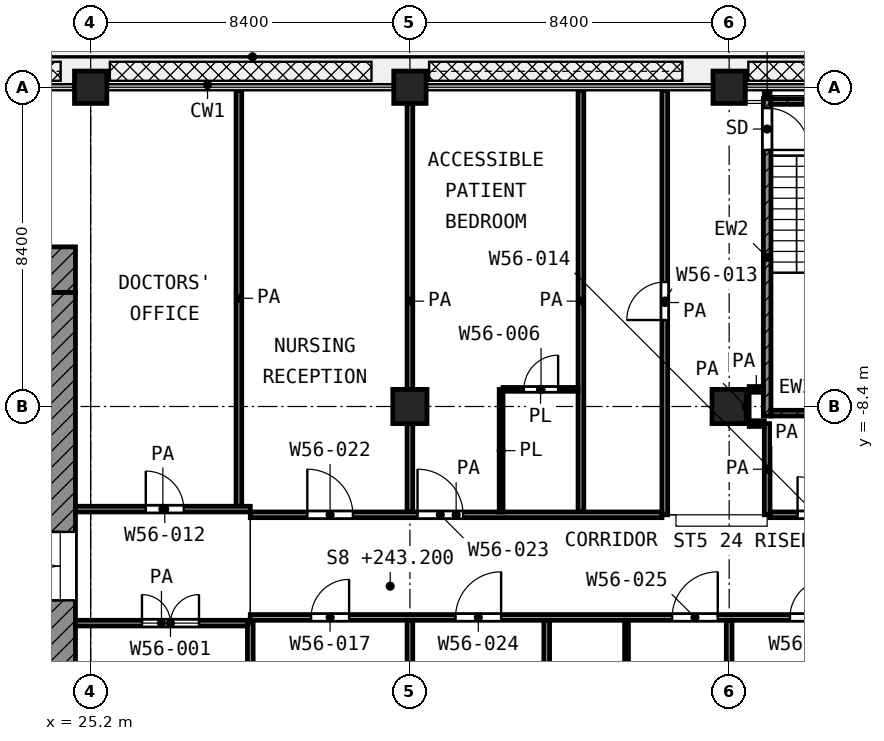
"""IFC4 building model, lengths in metres.
Left out: names, types, materials, properties, quantities, classifications, styles, units other than length and angle.
Written with IfcOpenShell. Run it as: python <this file> out.ifc"""

import sys

from ifc_helpers import new_model, si_unit, direction, frame, frame_2d, origin, origin_2d, place, context, subcontext, project, spatial, rectangle, extrude, element, fill, save


model = new_model("IFC4")
c1 = context("Model", 3, precision=1e-05, world=origin(), true_north=direction((0.0, 1.0)))
c2 = subcontext(c1, "Body", "Model", "MODEL_VIEW")
j1 = project(units=[si_unit("LENGTHUNIT", "METRE"), si_unit("PLANEANGLEUNIT", "RADIAN")], contexts=[c1])
p1 = place(None, origin())
s1 = spatial("IfcSite", under=j1, at=p1, CompositionType="ELEMENT")
p2 = place(p1, origin())
s2 = spatial("IfcBuilding", under=s1, at=p2, CompositionType="ELEMENT")
p3 = place(p2, frame((0.0, 0.0, 243.2)))
s3 = spatial("IfcBuildingStorey", under=s2, at=p3, CompositionType="ELEMENT", Elevation=243.2)
for number, where, z_axis, x_axis in (
    (1, (25.2, 0.0, 0.0), (0.0, 0.0, 1.0), (1.0, 0.0, 0.0)),
    (2, (33.6, 0.0, 0.0), (0.0, 0.0, 1.0), (1.0, 0.0, 0.0)),
    (3, (42.0, 0.0, 0.0), (0.0, 0.0, 1.0), (1.0, 0.0, 0.0)),
):
    element("IfcColumn", number, at=place(p3, frame(where, z_axis=z_axis, x_axis=x_axis)), inside=s3, PredefinedType="COLUMN", context=c2, shape_type="SweptSolid", body=[
        extrude(rectangle(XDim=0.85, YDim=0.85, at=origin_2d()), origin(), (0.0, 0.0, 1.0), 4.2),
    ])
for number, where, z_axis, x_axis in (
    (4, (33.6, -8.4, 0.0), (0.0, 0.0, 1.0), (1.0, 0.0, 0.0)),
    (5, (42.0, -8.4, 0.0), (0.0, 0.0, 1.0), (1.0, 0.0, 0.0)),
):
    element("IfcColumn", number, at=place(p3, frame(where, z_axis=z_axis, x_axis=x_axis)), inside=s3, PredefinedType="COLUMN", context=c2, shape_type="SweptSolid", body=[
        extrude(rectangle(XDim=0.9, YDim=0.9, at=origin_2d()), origin(), (0.0, 0.0, 1.0), 4.2),
    ])
p4 = place(p3, frame((4.2, -4.8, 0.0), z_axis=(0.0, 0.0, 1.0), x_axis=(1.0, 0.0, 0.0)))
e6 = element("IfcWall", 6, at=p4, inside=s3, PredefinedType="SHEAR", context=c2, shape_type="SweptSolid", body=[
    extrude(rectangle(XDim=20.6, YDim=1.2, at=frame_2d((10.3, 0.0))), origin(), (0.0, 0.0, 1.0), 3.6),
])
p5 = place(p4, frame((1.95, 0.0, 0.0)))
e7 = element("IfcOpeningElement", 7, at=p5, cuts=e6, PredefinedType="OPENING", context=c2, shape_type="SweptSolid", body=[
    extrude(rectangle(XDim=1.1, YDim=2.1, at=frame_2d((0.55, 1.05))), frame((0.0, 0.61, 0.0), z_axis=(0.0, -1.0, 0.0), x_axis=(1.0, 0.0, 0.0)), (0.0, 0.0, 1.0), 1.22),
])
p6 = place(p4, frame((17.95, 0.0, 0.0)))
e8 = element("IfcOpeningElement", 8, at=p6, cuts=e6, PredefinedType="OPENING", context=c2, shape_type="SweptSolid", body=[
    extrude(rectangle(XDim=1.1, YDim=2.1, at=frame_2d((0.55, 1.05))), frame((0.0, 0.61, 0.0), z_axis=(0.0, -1.0, 0.0), x_axis=(1.0, 0.0, 0.0)), (0.0, 0.0, 1.0), 1.22),
])
p7 = place(p3, frame((24.4, -24.0, 0.0), z_axis=(0.0, 0.0, 1.0), x_axis=(0.0, 1.0, 0.0)))
e9 = element("IfcWall", 9, at=p7, inside=s3, PredefinedType="SHEAR", context=c2, shape_type="SweptSolid", body=[
    extrude(rectangle(XDim=18.6, YDim=0.8, at=frame_2d((9.3, 0.0))), origin(), (0.0, 0.0, 1.0), 3.6),
])
p8 = place(p7, frame((10.5, 0.0, 0.0)))
e10 = element("IfcOpeningElement", 10, at=p8, cuts=e9, PredefinedType="OPENING", context=c2, shape_type="SweptSolid", body=[
    extrude(rectangle(XDim=1.8, YDim=2.1, at=frame_2d((0.9, 1.05))), frame((0.0, 0.41, 0.0), z_axis=(0.0, -1.0, 0.0), x_axis=(1.0, 0.0, 0.0)), (0.0, 0.0, 1.0), 0.82),
])
p9 = place(p3, frame((43.0, -8.65, 0.0), z_axis=(0.0, 0.0, 1.0), x_axis=(0.0, 1.0, 0.0)))
e11 = element("IfcWall", 11, at=p9, inside=s3, PredefinedType="SHEAR", context=c2, shape_type="SweptSolid", body=[
    extrude(rectangle(XDim=8.35, YDim=0.2, at=frame_2d((4.175, 0.0))), origin(), (0.0, 0.0, 1.0), 3.6),
])
p10 = place(p9, frame((7.0, 0.0, 0.0)))
e12 = element("IfcOpeningElement", 12, at=p10, cuts=e11, PredefinedType="OPENING", context=c2, shape_type="SweptSolid", body=[
    extrude(rectangle(XDim=1.1, YDim=2.1, at=frame_2d((0.55, 1.05))), frame((0.0, 0.11, 0.0), z_axis=(0.0, -1.0, 0.0), x_axis=(1.0, 0.0, 0.0)), (0.0, 0.0, 1.0), 0.22),
])
for number, where, z_axis, x_axis in (
    (13, (43.1, -0.375, 0.0), (0.0, 0.0, 1.0), (1.0, 0.0, 0.0)),
    (14, (43.1, -8.575, 0.0), (0.0, 0.0, 1.0), (1.0, 0.0, 0.0)),
):
    element("IfcWall", number, at=place(p3, frame(where, z_axis=z_axis, x_axis=x_axis)), inside=s3, PredefinedType="SHEAR", context=c2, shape_type="SweptSolid", body=[
        extrude(rectangle(XDim=2.85, YDim=0.15, at=frame_2d((1.425, 0.0))), origin(), (0.0, 0.0, 1.0), 3.6),
    ])
p11 = place(p3, frame((36.05, -7.95, 0.0), z_axis=(0.0, 0.0, 1.0), x_axis=(1.0, 0.0, 0.0)))
e15 = element("IfcWall", 15, at=p11, inside=s3, PredefinedType="PARTITIONING", context=c2, shape_type="SweptSolid", body=[
    extrude(rectangle(XDim=1.975, YDim=0.1, at=frame_2d((0.987, 0.0))), origin(), (0.0, 0.0, 1.0), 3.6),
])
p12 = place(p11, frame((0.55, 0.0, 0.0)))
e16 = element("IfcOpeningElement", 16, at=p12, cuts=e15, PredefinedType="OPENING", context=c2, shape_type="SweptSolid", body=[
    extrude(rectangle(XDim=0.9, YDim=2.1, at=frame_2d((0.45, 1.05))), frame((0.0, 0.06, 0.0), z_axis=(0.0, -1.0, 0.0), x_axis=(1.0, 0.0, 0.0)), (0.0, 0.0, 1.0), 0.12),
])
for number, where, z_axis, x_axis in (
    (17, (36.0, -11.175, 0.0), (0.0, 0.0, 1.0), (0.0, 1.0, 0.0)),
    (18, (39.3, -17.25, 0.0), (0.0, 0.0, 1.0), (0.0, 1.0, 0.0)),
):
    element("IfcWall", number, at=place(p3, frame(where, z_axis=z_axis, x_axis=x_axis)), inside=s3, PredefinedType="PARTITIONING", context=c2, shape_type="SweptSolid", body=[
        extrude(rectangle(XDim=3.225, YDim=0.1, at=frame_2d((1.613, 0.0))), origin(), (0.0, 0.0, 1.0), 3.6),
    ])
p13 = place(p3, frame((24.8, -14.1, 0.0), z_axis=(0.0, 0.0, 1.0), x_axis=(1.0, 0.0, 0.0)))
e19 = element("IfcWall", 19, at=p13, inside=s3, PredefinedType="PARTITIONING", context=c2, shape_type="SweptSolid", body=[
    extrude(rectangle(XDim=4.525, YDim=0.15, at=frame_2d((2.262, 0.0))), origin(), (0.0, 0.0, 1.0), 3.6),
])
p14 = place(p13, frame((1.75, 0.0, 0.0)))
e20 = element("IfcOpeningElement", 20, at=p14, cuts=e19, PredefinedType="OPENING", context=c2, shape_type="SweptSolid", body=[
    extrude(rectangle(XDim=1.5, YDim=2.1, at=frame_2d((0.75, 1.05))), frame((0.0, 0.085, 0.0), z_axis=(0.0, -1.0, 0.0), x_axis=(1.0, 0.0, 0.0)), (0.0, 0.0, 1.0), 0.17),
])
p15 = place(p3, frame((29.4, -13.95, 0.0), z_axis=(0.0, 0.0, 1.0), x_axis=(1.0, 0.0, 0.0)))
e21 = element("IfcWall", 21, at=p15, inside=s3, PredefinedType="PARTITIONING", context=c2, shape_type="SweptSolid", body=[
    extrude(rectangle(XDim=33.52, YDim=0.15, at=frame_2d((16.76, 0.0))), origin(), (0.0, 0.0, 1.0), 2.7),
])
p16 = place(p15, frame((1.6, 0.0, 0.0)))
e22 = element("IfcOpeningElement", 22, at=p16, cuts=e21, PredefinedType="OPENING", context=c2, shape_type="SweptSolid", body=[
    extrude(rectangle(XDim=1.0, YDim=2.1, at=frame_2d((0.5, 1.05))), frame((0.0, 0.085, 0.0), z_axis=(0.0, -1.0, 0.0), x_axis=(1.0, 0.0, 0.0)), (0.0, 0.0, 1.0), 0.17),
])
p17 = place(p15, frame((5.4, 0.0, 0.0)))
e23 = element("IfcOpeningElement", 23, at=p17, cuts=e21, PredefinedType="OPENING", context=c2, shape_type="SweptSolid", body=[
    extrude(rectangle(XDim=1.2, YDim=2.1, at=frame_2d((0.6, 1.05))), frame((0.0, 0.085, 0.0), z_axis=(0.0, -1.0, 0.0), x_axis=(1.0, 0.0, 0.0)), (0.0, 0.0, 1.0), 0.17),
])
p18 = place(p15, frame((11.1, 0.0, 0.0)))
e24 = element("IfcOpeningElement", 24, at=p18, cuts=e21, PredefinedType="OPENING", context=c2, shape_type="SweptSolid", body=[
    extrude(rectangle(XDim=1.2, YDim=2.1, at=frame_2d((0.6, 1.05))), frame((0.0, 0.085, 0.0), z_axis=(0.0, -1.0, 0.0), x_axis=(1.0, 0.0, 0.0)), (0.0, 0.0, 1.0), 0.17),
])
p19 = place(p15, frame((14.2, 0.0, 0.0)))
e25 = element("IfcOpeningElement", 25, at=p19, cuts=e21, PredefinedType="OPENING", context=c2, shape_type="SweptSolid", body=[
    extrude(rectangle(XDim=1.0, YDim=2.1, at=frame_2d((0.5, 1.05))), frame((0.0, 0.085, 0.0), z_axis=(0.0, -1.0, 0.0), x_axis=(1.0, 0.0, 0.0)), (0.0, 0.0, 1.0), 0.17),
])
p20 = place(p15, frame((19.6, 0.0, 0.0)))
e26 = element("IfcOpeningElement", 26, at=p20, cuts=e21, PredefinedType="OPENING", context=c2, shape_type="SweptSolid", body=[
    extrude(rectangle(XDim=1.2, YDim=2.1, at=frame_2d((0.6, 1.05))), frame((0.0, 0.085, 0.0), z_axis=(0.0, -1.0, 0.0), x_axis=(1.0, 0.0, 0.0)), (0.0, 0.0, 1.0), 0.17),
])
p21 = place(p15, frame((22.2, 0.0, 0.0)))
e27 = element("IfcOpeningElement", 27, at=p21, cuts=e21, PredefinedType="OPENING", context=c2, shape_type="SweptSolid", body=[
    extrude(rectangle(XDim=1.2, YDim=2.1, at=frame_2d((0.6, 1.05))), frame((0.0, 0.085, 0.0), z_axis=(0.0, -1.0, 0.0), x_axis=(1.0, 0.0, 0.0)), (0.0, 0.0, 1.0), 0.17),
])
p22 = place(p15, frame((28.95, 0.0, 0.0)))
e28 = element("IfcOpeningElement", 28, at=p22, cuts=e21, PredefinedType="OPENING", context=c2, shape_type="SweptSolid", body=[
    extrude(rectangle(XDim=1.5, YDim=2.1, at=frame_2d((0.75, 1.05))), frame((0.0, 0.085, 0.0), z_axis=(0.0, -1.0, 0.0), x_axis=(1.0, 0.0, 0.0)), (0.0, 0.0, 1.0), 0.17),
])
p23 = place(p3, frame((29.4, -11.25, 0.0), z_axis=(0.0, 0.0, 1.0), x_axis=(1.0, 0.0, 0.0)))
e29 = element("IfcWall", 29, at=p23, inside=s3, PredefinedType="PARTITIONING", context=c2, shape_type="SweptSolid", body=[
    extrude(rectangle(XDim=10.832, YDim=0.15, at=frame_2d((5.416, 0.0))), origin(), (0.0, 0.0, 1.0), 3.6),
])
p24 = place(p23, frame((1.5, 0.0, 0.0)))
e30 = element("IfcOpeningElement", 30, at=p24, cuts=e29, PredefinedType="OPENING", context=c2, shape_type="SweptSolid", body=[
    extrude(rectangle(XDim=1.2, YDim=2.1, at=frame_2d((0.6, 1.05))), frame((0.0, 0.085, 0.0), z_axis=(0.0, -1.0, 0.0), x_axis=(1.0, 0.0, 0.0)), (0.0, 0.0, 1.0), 0.17),
])
p25 = place(p23, frame((4.4, 0.0, 0.0)))
e31 = element("IfcOpeningElement", 31, at=p25, cuts=e29, PredefinedType="OPENING", context=c2, shape_type="SweptSolid", body=[
    extrude(rectangle(XDim=1.2, YDim=2.1, at=frame_2d((0.6, 1.05))), frame((0.0, 0.085, 0.0), z_axis=(0.0, -1.0, 0.0), x_axis=(1.0, 0.0, 0.0)), (0.0, 0.0, 1.0), 0.17),
])
p26 = place(p3, frame((43.075, -11.25, 0.0), z_axis=(0.0, 0.0, 1.0), x_axis=(1.0, 0.0, 0.0)))
e32 = element("IfcWall", 32, at=p26, inside=s3, PredefinedType="PARTITIONING", context=c2, shape_type="SweptSolid", body=[
    extrude(rectangle(XDim=5.375, YDim=0.15, at=frame_2d((2.688, 0.0))), origin(), (0.0, 0.0, 1.0), 3.6),
])
p27 = place(p26, frame((0.725, 0.0, 0.0)))
e33 = element("IfcOpeningElement", 33, at=p27, cuts=e32, PredefinedType="OPENING", context=c2, shape_type="SweptSolid", body=[
    extrude(rectangle(XDim=1.0, YDim=2.1, at=frame_2d((0.5, 1.05))), frame((0.0, 0.085, 0.0), z_axis=(0.0, -1.0, 0.0), x_axis=(1.0, 0.0, 0.0)), (0.0, 0.0, 1.0), 0.17),
])
p28 = place(p26, frame((3.487, 0.0, 0.0)))
e34 = element("IfcOpeningElement", 34, at=p28, cuts=e32, PredefinedType="OPENING", context=c2, shape_type="SweptSolid", body=[
    extrude(rectangle(XDim=1.0, YDim=2.1, at=frame_2d((0.5, 1.05))), frame((0.0, 0.085, 0.0), z_axis=(0.0, -1.0, 0.0), x_axis=(1.0, 0.0, 0.0)), (0.0, 0.0, 1.0), 0.17),
])
p29 = place(p3, frame((24.8, -11.1, 0.0), z_axis=(0.0, 0.0, 1.0), x_axis=(1.0, 0.0, 0.0)))
e35 = element("IfcWall", 35, at=p29, inside=s3, PredefinedType="PARTITIONING", context=c2, shape_type="SweptSolid", body=[
    extrude(rectangle(XDim=4.6, YDim=0.15, at=frame_2d((2.3, 0.0))), origin(), (0.0, 0.0, 1.0), 3.6),
])
p30 = place(p29, frame((1.85, 0.0, 0.0)))
e36 = element("IfcOpeningElement", 36, at=p30, cuts=e35, PredefinedType="OPENING", context=c2, shape_type="SweptSolid", body=[
    extrude(rectangle(XDim=1.0, YDim=2.1, at=frame_2d((0.5, 1.05))), frame((0.0, 0.085, 0.0), z_axis=(0.0, -1.0, 0.0), x_axis=(1.0, 0.0, 0.0)), (0.0, 0.0, 1.0), 0.17),
])
p31 = place(p3, frame((42.527, -8.85, 0.0), z_axis=(0.0, 0.0, 1.0), x_axis=(1.0, 0.0, 0.0)))
e37 = element("IfcWall", 37, at=p31, inside=s3, PredefinedType="PARTITIONING", context=c2, shape_type="SweptSolid", body=[
    extrude(rectangle(XDim=0.398, YDim=0.15, at=frame_2d((0.199, 0.0))), origin(), (0.0, 0.0, 1.0), 3.6),
])
p32 = place(p3, frame((42.527, -7.95, 0.0), z_axis=(0.0, 0.0, 1.0), x_axis=(1.0, 0.0, 0.0)))
e38 = element("IfcWall", 38, at=p32, inside=s3, PredefinedType="PARTITIONING", context=c2, shape_type="SweptSolid", body=[
    extrude(rectangle(XDim=0.373, YDim=0.15, at=frame_2d((0.187, 0.0))), origin(), (0.0, 0.0, 1.0), 3.6),
])
p33 = place(p3, frame((29.1, -11.025, 0.0), z_axis=(0.0, 0.0, 1.0), x_axis=(0.0, 1.0, 0.0)))
e39 = element("IfcWall", 39, at=p33, inside=s3, PredefinedType="PARTITIONING", context=c2, shape_type="SweptSolid", body=[
    extrude(rectangle(XDim=10.945, YDim=0.15, at=frame_2d((5.472, 0.0))), origin(), (0.0, 0.0, 1.0), 3.6),
])
p34 = place(p3, frame((29.4, -25.2, 0.0), z_axis=(0.0, 0.0, 1.0), x_axis=(0.0, 1.0, 0.0)))
e40 = element("IfcWall", 40, at=p34, inside=s3, PredefinedType="PARTITIONING", context=c2, shape_type="SweptSolid", body=[
    extrude(rectangle(XDim=11.1, YDim=0.15, at=frame_2d((5.55, 0.0))), origin(), (0.0, 0.0, 1.0), 3.6),
])
p35 = place(p3, frame((33.6, -25.12, 0.0), z_axis=(0.0, 0.0, 1.0), x_axis=(0.0, 1.0, 0.0)))
e41 = element("IfcWall", 41, at=p35, inside=s3, PredefinedType="PARTITIONING", context=c2, shape_type="SweptSolid", body=[
    extrude(rectangle(XDim=11.095, YDim=0.15, at=frame_2d((5.548, 0.0))), origin(), (0.0, 0.0, 1.0), 3.6),
])
p36 = place(p3, frame((33.6, -11.175, 0.0), z_axis=(0.0, 0.0, 1.0), x_axis=(0.0, 1.0, 0.0)))
e42 = element("IfcWall", 42, at=p36, inside=s3, PredefinedType="PARTITIONING", context=c2, shape_type="SweptSolid", body=[
    extrude(rectangle(XDim=11.095, YDim=0.15, at=frame_2d((5.547, 0.0))), origin(), (0.0, 0.0, 1.0), 3.6),
])
p37 = place(p3, frame((37.2, -25.12, 0.0), z_axis=(0.0, 0.0, 1.0), x_axis=(0.0, 1.0, 0.0)))
e43 = element("IfcWall", 43, at=p37, inside=s3, PredefinedType="PARTITIONING", context=c2, shape_type="SweptSolid", body=[
    extrude(rectangle(XDim=11.095, YDim=0.15, at=frame_2d((5.548, 0.0))), origin(), (0.0, 0.0, 1.0), 3.6),
])
p38 = place(p3, frame((38.1, -11.175, 0.0), z_axis=(0.0, 0.0, 1.0), x_axis=(0.0, 1.0, 0.0)))
e44 = element("IfcWall", 44, at=p38, inside=s3, PredefinedType="PARTITIONING", context=c2, shape_type="SweptSolid", body=[
    extrude(rectangle(XDim=11.095, YDim=0.15, at=frame_2d((5.547, 0.0))), origin(), (0.0, 0.0, 1.0), 3.6),
])
p39 = place(p3, frame((40.307, -11.25, 0.0), z_axis=(0.0, 0.0, 1.0), x_axis=(0.0, 1.0, 0.0)))
e45 = element("IfcWall", 45, at=p39, inside=s3, PredefinedType="PARTITIONING", context=c2, shape_type="SweptSolid", body=[
    extrude(rectangle(XDim=11.17, YDim=0.15, at=frame_2d((5.585, 0.0))), origin(), (0.0, 0.0, 1.0), 3.6),
])
p40 = place(p39, frame((5.125, 0.0, 0.0)))
e46 = element("IfcOpeningElement", 46, at=p40, cuts=e45, PredefinedType="OPENING", context=c2, shape_type="SweptSolid", body=[
    extrude(rectangle(XDim=1.0, YDim=2.1, at=frame_2d((0.5, 1.05))), frame((0.0, 0.085, 0.0), z_axis=(0.0, -1.0, 0.0), x_axis=(1.0, 0.0, 0.0)), (0.0, 0.0, 1.0), 0.17),
])
p41 = place(p3, frame((42.0, -25.12, 0.0), z_axis=(0.0, 0.0, 1.0), x_axis=(0.0, 1.0, 0.0)))
e47 = element("IfcWall", 47, at=p41, inside=s3, PredefinedType="PARTITIONING", context=c2, shape_type="SweptSolid", body=[
    extrude(rectangle(XDim=11.095, YDim=0.15, at=frame_2d((5.548, 0.0))), origin(), (0.0, 0.0, 1.0), 3.6),
])
p42 = place(p3, frame((42.45, -8.849, 0.0), z_axis=(0.0, 0.0, 1.0), x_axis=(0.0, 1.0, 0.0)))
e48 = element("IfcWall", 48, at=p42, inside=s3, PredefinedType="PARTITIONING", context=c2, shape_type="SweptSolid", body=[
    extrude(rectangle(XDim=0.897, YDim=0.15, at=frame_2d((0.449, 0.0))), origin(), (0.0, 0.0, 1.0), 3.6),
])
p43 = place(p3, frame((43.0, -11.25, 0.0), z_axis=(0.0, 0.0, 1.0), x_axis=(0.0, 1.0, 0.0)))
e49 = element("IfcWall", 49, at=p43, inside=s3, PredefinedType="PARTITIONING", context=c2, shape_type="SweptSolid", body=[
    extrude(rectangle(XDim=2.4, YDim=0.15, at=frame_2d((1.2, 0.0))), origin(), (0.0, 0.0, 1.0), 3.6),
])
p44 = place(p3, frame((43.0, -0.27, 0.0), z_axis=(0.0, 0.0, 1.0), x_axis=(0.0, 1.0, 0.0)))
e50 = element("IfcWall", 50, at=p44, inside=s3, PredefinedType="PARTITIONING", context=c2, shape_type="SweptSolid", body=[
    extrude(rectangle(XDim=0.19, YDim=0.15, at=frame_2d((0.095, 0.0))), origin(), (0.0, 0.0, 1.0), 3.6),
])
p45 = place(p8, origin())
e51 = element("IfcDoor", 51, at=p45, inside=s3, OperationType="DOUBLE_DOOR_SINGLE_SWING", PredefinedType="DOOR", context=c2, shape_type="SweptSolid", body=[
    extrude(rectangle(XDim=1.8, YDim=2.1, at=frame_2d((0.9, 1.05))), frame((0.0, 0.025, 0.0), z_axis=(0.0, -1.0, 0.0), x_axis=(1.0, 0.0, 0.0)), (0.0, 0.0, 1.0), 0.05),
])
fill(e10, e51)
p46 = place(p10, frame((1.1, 0.0, 0.0), z_axis=(0.0, 0.0, 1.0), x_axis=(-1.0, 0.0, 0.0)))
e52 = element("IfcDoor", 52, at=p46, inside=s3, OperationType="SINGLE_SWING_LEFT", PredefinedType="DOOR", context=c2, shape_type="SweptSolid", body=[
    extrude(rectangle(XDim=1.1, YDim=2.1, at=frame_2d((0.55, 1.05))), frame((0.0, 0.025, 0.0), z_axis=(0.0, -1.0, 0.0), x_axis=(1.0, 0.0, 0.0)), (0.0, 0.0, 1.0), 0.05),
])
fill(e12, e52)
p47 = place(p14, origin())
e53 = element("IfcDoor", 53, at=p47, inside=s3, OperationType="DOUBLE_DOOR_SINGLE_SWING", PredefinedType="DOOR", context=c2, shape_type="SweptSolid", body=[
    extrude(rectangle(XDim=1.5, YDim=2.1, at=frame_2d((0.75, 1.05))), frame((0.0, 0.025, 0.0), z_axis=(0.0, -1.0, 0.0), x_axis=(1.0, 0.0, 0.0)), (0.0, 0.0, 1.0), 0.05),
])
fill(e20, e53)
p48 = place(p30, origin())
e54 = element("IfcDoor", 54, at=p48, inside=s3, OperationType="SINGLE_SWING_LEFT", PredefinedType="DOOR", context=c2, shape_type="SweptSolid", body=[
    extrude(rectangle(XDim=1.0, YDim=2.1, at=frame_2d((0.5, 1.05))), frame((0.0, 0.025, 0.0), z_axis=(0.0, -1.0, 0.0), x_axis=(1.0, 0.0, 0.0)), (0.0, 0.0, 1.0), 0.05),
])
fill(e36, e54)
p49 = place(p24, origin())
e55 = element("IfcDoor", 55, at=p49, inside=s3, OperationType="SINGLE_SWING_LEFT", PredefinedType="DOOR", context=c2, shape_type="SweptSolid", body=[
    extrude(rectangle(XDim=1.2, YDim=2.1, at=frame_2d((0.6, 1.05))), frame((0.0, 0.025, 0.0), z_axis=(0.0, -1.0, 0.0), x_axis=(1.0, 0.0, 0.0)), (0.0, 0.0, 1.0), 0.05),
])
fill(e30, e55)
p50 = place(p25, origin())
e56 = element("IfcDoor", 56, at=p50, inside=s3, OperationType="SINGLE_SWING_LEFT", PredefinedType="DOOR", context=c2, shape_type="SweptSolid", body=[
    extrude(rectangle(XDim=1.2, YDim=2.1, at=frame_2d((0.6, 1.05))), frame((0.0, 0.025, 0.0), z_axis=(0.0, -1.0, 0.0), x_axis=(1.0, 0.0, 0.0)), (0.0, 0.0, 1.0), 0.05),
])
fill(e31, e56)
p51 = place(p12, origin())
e57 = element("IfcDoor", 57, at=p51, inside=s3, OperationType="SINGLE_SWING_RIGHT", PredefinedType="DOOR", context=c2, shape_type="SweptSolid", body=[
    extrude(rectangle(XDim=0.9, YDim=2.1, at=frame_2d((0.45, 1.05))), frame((0.0, 0.025, 0.0), z_axis=(0.0, -1.0, 0.0), x_axis=(1.0, 0.0, 0.0)), (0.0, 0.0, 1.0), 0.05),
])
fill(e16, e57)
p52 = place(p40, origin())
e58 = element("IfcDoor", 58, at=p52, inside=s3, OperationType="SINGLE_SWING_LEFT", PredefinedType="DOOR", context=c2, shape_type="SweptSolid", body=[
    extrude(rectangle(XDim=1.0, YDim=2.1, at=frame_2d((0.5, 1.05))), frame((0.0, 0.025, 0.0), z_axis=(0.0, -1.0, 0.0), x_axis=(1.0, 0.0, 0.0)), (0.0, 0.0, 1.0), 0.05),
])
fill(e46, e58)
p53 = place(p27, origin())
e59 = element("IfcDoor", 59, at=p53, inside=s3, OperationType="SINGLE_SWING_LEFT", PredefinedType="DOOR", context=c2, shape_type="SweptSolid", body=[
    extrude(rectangle(XDim=1.0, YDim=2.1, at=frame_2d((0.5, 1.05))), frame((0.0, 0.025, 0.0), z_axis=(0.0, -1.0, 0.0), x_axis=(1.0, 0.0, 0.0)), (0.0, 0.0, 1.0), 0.05),
])
fill(e33, e59)
p54 = place(p16, origin())
e60 = element("IfcDoor", 60, at=p54, inside=s3, OperationType="SINGLE_SWING_RIGHT", PredefinedType="DOOR", context=c2, shape_type="SweptSolid", body=[
    extrude(rectangle(XDim=1.0, YDim=2.1, at=frame_2d((0.5, 1.05))), frame((0.0, 0.025, 0.0), z_axis=(0.0, -1.0, 0.0), x_axis=(1.0, 0.0, 0.0)), (0.0, 0.0, 1.0), 0.05),
])
fill(e22, e60)
p55 = place(p17, origin())
e61 = element("IfcDoor", 61, at=p55, inside=s3, OperationType="SINGLE_SWING_RIGHT", PredefinedType="DOOR", context=c2, shape_type="SweptSolid", body=[
    extrude(rectangle(XDim=1.2, YDim=2.1, at=frame_2d((0.6, 1.05))), frame((0.0, 0.025, 0.0), z_axis=(0.0, -1.0, 0.0), x_axis=(1.0, 0.0, 0.0)), (0.0, 0.0, 1.0), 0.05),
])
fill(e23, e61)
p56 = place(p18, origin())
e62 = element("IfcDoor", 62, at=p56, inside=s3, OperationType="SINGLE_SWING_RIGHT", PredefinedType="DOOR", context=c2, shape_type="SweptSolid", body=[
    extrude(rectangle(XDim=1.2, YDim=2.1, at=frame_2d((0.6, 1.05))), frame((0.0, 0.025, 0.0), z_axis=(0.0, -1.0, 0.0), x_axis=(1.0, 0.0, 0.0)), (0.0, 0.0, 1.0), 0.05),
])
fill(e24, e62)
p57 = place(p19, origin())
e63 = element("IfcDoor", 63, at=p57, inside=s3, OperationType="SINGLE_SWING_RIGHT", PredefinedType="DOOR", context=c2, shape_type="SweptSolid", body=[
    extrude(rectangle(XDim=1.0, YDim=2.1, at=frame_2d((0.5, 1.05))), frame((0.0, 0.025, 0.0), z_axis=(0.0, -1.0, 0.0), x_axis=(1.0, 0.0, 0.0)), (0.0, 0.0, 1.0), 0.05),
])
fill(e25, e63)
save(model, sys.argv[1])
